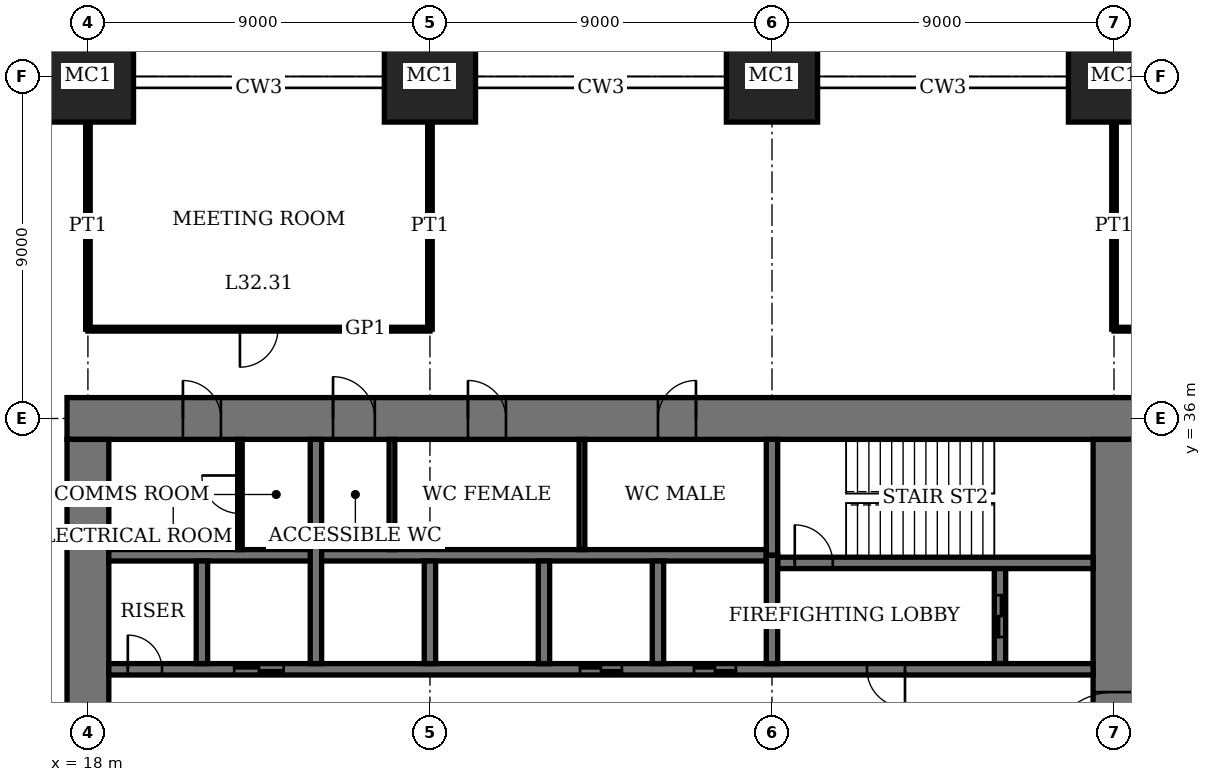
"""IFC4 building model, lengths in metres.
Left out: names, types, materials, properties, quantities, classifications, styles, units other than length and angle.
Written with IfcOpenShell. Run it as: python <this file> out.ifc"""

import sys

from ifc_helpers import new_model, si_unit, direction, frame, frame_2d, origin, origin_2d, place, context, subcontext, project, spatial, rectangle, extrude, element, fill, save


model = new_model("IFC4")
c1 = context("Model", 3, precision=1e-05, world=origin(), true_north=direction((0.0, 1.0)))
c2 = subcontext(c1, "Body", "Model", "MODEL_VIEW")
j1 = project(units=[si_unit("LENGTHUNIT", "METRE"), si_unit("PLANEANGLEUNIT", "RADIAN")], contexts=[c1])
p1 = place(None, origin())
s1 = spatial("IfcSite", under=j1, at=p1, CompositionType="ELEMENT")
p2 = place(p1, origin())
s2 = spatial("IfcBuilding", under=s1, at=p2, CompositionType="ELEMENT")
p3 = place(p2, frame((0.0, 0.0, 133.0)))
s3 = spatial("IfcBuildingStorey", under=s2, at=p3, CompositionType="ELEMENT", Elevation=133.0)
for number, where, z_axis, x_axis in (
    (1, (18.0, 45.0, 0.0), (0.0, 0.0, 1.0), (1.0, 0.0, 0.0)),
    (2, (27.0, 45.0, 0.0), (0.0, 0.0, 1.0), (1.0, 0.0, 0.0)),
    (3, (36.0, 45.0, 0.0), (0.0, 0.0, 1.0), (1.0, 0.0, 0.0)),
    (4, (45.0, 45.0, 0.0), (0.0, 0.0, 1.0), (1.0, 0.0, 0.0)),
):
    element("IfcColumn", number, at=place(p3, frame(where, z_axis=z_axis, x_axis=x_axis)), inside=s3, PredefinedType="COLUMN", context=c2, shape_type="SweptSolid", body=[
        extrude(rectangle(XDim=2.4, YDim=2.4, at=origin_2d()), origin(), (0.0, 0.0, 1.0), 4.0),
    ])
p4 = place(p3, frame((45.55, 36.0, 0.0), z_axis=(0.0, 0.0, 1.0), x_axis=(-1.0, 0.0, 0.0)))
e5 = element("IfcWall", 5, at=p4, inside=s3, PredefinedType="SHEAR", context=c2, shape_type="SweptSolid", body=[
    extrude(rectangle(XDim=28.1, YDim=1.1, at=frame_2d((14.05, 0.0))), origin(), (0.0, 0.0, 1.0), 4.0),
])
p5 = place(p4, frame((11.55, 0.0, 0.0)))
e6 = element("IfcOpeningElement", 6, at=p5, cuts=e5, PredefinedType="OPENING", context=c2, shape_type="SweptSolid", body=[
    extrude(rectangle(XDim=1.0, YDim=2.4, at=frame_2d((0.5, 1.2))), frame((0.0, 0.56, 0.0), z_axis=(0.0, -1.0, 0.0), x_axis=(1.0, 0.0, 0.0)), (0.0, 0.0, 1.0), 1.12),
])
p6 = place(p4, frame((16.55, 0.0, 0.0)))
e7 = element("IfcOpeningElement", 7, at=p6, cuts=e5, PredefinedType="OPENING", context=c2, shape_type="SweptSolid", body=[
    extrude(rectangle(XDim=1.0, YDim=2.4, at=frame_2d((0.5, 1.2))), frame((0.0, 0.56, 0.0), z_axis=(0.0, -1.0, 0.0), x_axis=(1.0, 0.0, 0.0)), (0.0, 0.0, 1.0), 1.12),
])
p7 = place(p4, frame((20.0, 0.0, 0.0)))
e8 = element("IfcOpeningElement", 8, at=p7, cuts=e5, PredefinedType="OPENING", context=c2, shape_type="SweptSolid", body=[
    extrude(rectangle(XDim=1.1, YDim=2.4, at=frame_2d((0.55, 1.2))), frame((0.0, 0.56, 0.0), z_axis=(0.0, -1.0, 0.0), x_axis=(1.0, 0.0, 0.0)), (0.0, 0.0, 1.0), 1.12),
])
p8 = place(p4, frame((24.05, 0.0, 0.0)))
e9 = element("IfcOpeningElement", 9, at=p8, cuts=e5, PredefinedType="OPENING", context=c2, shape_type="SweptSolid", body=[
    extrude(rectangle(XDim=1.0, YDim=2.4, at=frame_2d((0.5, 1.2))), frame((0.0, 0.56, 0.0), z_axis=(0.0, -1.0, 0.0), x_axis=(1.0, 0.0, 0.0)), (0.0, 0.0, 1.0), 1.12),
])
p9 = place(p3, frame((18.0, 35.45, 0.0), z_axis=(0.0, 0.0, 1.0), x_axis=(0.0, -1.0, 0.0)))
e10 = element("IfcWall", 10, at=p9, inside=s3, PredefinedType="SHEAR", context=c2, shape_type="SweptSolid", body=[
    extrude(rectangle(XDim=16.9, YDim=1.1, at=frame_2d((8.45, 0.0))), origin(), (0.0, 0.0, 1.0), 4.0),
])
p10 = place(p9, frame((8.45, 0.0, 0.0)))
e11 = element("IfcOpeningElement", 11, at=p10, cuts=e10, PredefinedType="OPENING", context=c2, shape_type="SweptSolid", body=[
    extrude(rectangle(XDim=1.8, YDim=2.4, at=frame_2d((0.9, 1.2))), frame((0.0, 0.56, 0.0), z_axis=(0.0, -1.0, 0.0), x_axis=(1.0, 0.0, 0.0)), (0.0, 0.0, 1.0), 1.12),
])
p11 = place(p3, frame((45.0, 18.55, 0.0), z_axis=(0.0, 0.0, 1.0), x_axis=(0.0, 1.0, 0.0)))
e12 = element("IfcWall", 12, at=p11, inside=s3, PredefinedType="SHEAR", context=c2, shape_type="SweptSolid", body=[
    extrude(rectangle(XDim=16.9, YDim=1.1, at=frame_2d((8.45, 0.0))), origin(), (0.0, 0.0, 1.0), 4.0),
])
p12 = place(p11, frame((8.45, 0.0, 0.0)))
e13 = element("IfcOpeningElement", 13, at=p12, cuts=e12, PredefinedType="OPENING", context=c2, shape_type="SweptSolid", body=[
    extrude(rectangle(XDim=1.8, YDim=2.4, at=frame_2d((0.9, 1.2))), frame((0.0, 0.56, 0.0), z_axis=(0.0, -1.0, 0.0), x_axis=(1.0, 0.0, 0.0)), (0.0, 0.0, 1.0), 1.12),
])
p13 = place(p3, frame((36.15, 32.2, 0.0), z_axis=(0.0, 0.0, 1.0), x_axis=(1.0, 0.0, 0.0)))
e14 = element("IfcWall", 14, at=p13, inside=s3, PredefinedType="SHEAR", context=c2, shape_type="SweptSolid", body=[
    extrude(rectangle(XDim=8.3, YDim=0.3, at=frame_2d((4.15, 0.0))), origin(), (0.0, 0.0, 1.0), 4.0),
])
p14 = place(p13, frame((0.45, 0.0, 0.0)))
e15 = element("IfcOpeningElement", 15, at=p14, cuts=e14, PredefinedType="OPENING", context=c2, shape_type="SweptSolid", body=[
    extrude(rectangle(XDim=1.0, YDim=2.4, at=frame_2d((0.5, 1.2))), frame((0.0, 0.16, 0.0), z_axis=(0.0, -1.0, 0.0), x_axis=(1.0, 0.0, 0.0)), (0.0, 0.0, 1.0), 0.32),
])
p15 = place(p3, frame((36.0, 32.4, 0.0), z_axis=(0.0, 0.0, 1.0), x_axis=(0.0, 1.0, 0.0)))
e16 = element("IfcWall", 16, at=p15, inside=s3, PredefinedType="SHEAR", context=c2, shape_type="SweptSolid", body=[
    extrude(rectangle(XDim=3.05, YDim=0.3, at=frame_2d((1.525, 0.0))), origin(), (0.0, 0.0, 1.0), 4.0),
])
p16 = place(p3, frame((42.0, 29.55, 0.0), z_axis=(0.0, 0.0, 1.0), x_axis=(0.0, 1.0, 0.0)))
e17 = element("IfcWall", 17, at=p16, inside=s3, PredefinedType="SHEAR", context=c2, shape_type="SweptSolid", body=[
    extrude(rectangle(XDim=2.5, YDim=0.3, at=frame_2d((1.25, 0.0))), origin(), (0.0, 0.0, 1.0), 4.0),
])
p17 = place(p16, frame((0.7, 0.0, 0.0)))
e18 = element("IfcOpeningElement", 18, at=p17, cuts=e17, PredefinedType="OPENING", context=c2, shape_type="SweptSolid", body=[
    extrude(rectangle(XDim=1.1, YDim=2.4, at=frame_2d((0.55, 1.2))), frame((0.0, 0.16, 0.0), z_axis=(0.0, -1.0, 0.0), x_axis=(1.0, 0.0, 0.0)), (0.0, 0.0, 1.0), 0.32),
])
p18 = place(p3, frame((18.55, 29.4, 0.0), z_axis=(0.0, 0.0, 1.0), x_axis=(1.0, 0.0, 0.0)))
e19 = element("IfcWall", 19, at=p18, inside=s3, PredefinedType="SHEAR", context=c2, shape_type="SweptSolid", body=[
    extrude(rectangle(XDim=25.9, YDim=0.3, at=frame_2d((12.95, 0.0))), origin(), (0.0, 0.0, 1.0), 4.0),
])
p19 = place(p18, frame((19.95, 0.0, 0.0)))
e20 = element("IfcOpeningElement", 20, at=p19, cuts=e19, PredefinedType="OPENING", context=c2, shape_type="SweptSolid", body=[
    extrude(rectangle(XDim=1.0, YDim=2.4, at=frame_2d((0.5, 1.2))), frame((0.0, 0.16, 0.0), z_axis=(0.0, -1.0, 0.0), x_axis=(1.0, 0.0, 0.0)), (0.0, 0.0, 1.0), 0.32),
])
p20 = place(p18, frame((0.5, 0.0, 0.0)))
e21 = element("IfcOpeningElement", 21, at=p20, cuts=e19, PredefinedType="OPENING", context=c2, shape_type="SweptSolid", body=[
    extrude(rectangle(XDim=0.9, YDim=2.1, at=frame_2d((0.45, 1.05))), frame((0.0, 0.16, 0.0), z_axis=(0.0, -1.0, 0.0), x_axis=(1.0, 0.0, 0.0)), (0.0, 0.0, 1.0), 0.32),
])
p21 = place(p18, frame((15.4, 0.0, 0.0)))
e22 = element("IfcOpeningElement", 22, at=p21, cuts=e19, PredefinedType="OPENING", context=c2, shape_type="SweptSolid", body=[
    extrude(rectangle(XDim=1.1, YDim=2.4, at=frame_2d((0.55, 1.2))), frame((0.0, 0.16, 0.0), z_axis=(0.0, -1.0, 0.0), x_axis=(1.0, 0.0, 0.0)), (0.0, 0.0, 1.0), 0.32),
])
p22 = place(p18, frame((12.4, 0.0, 0.0)))
e23 = element("IfcOpeningElement", 23, at=p22, cuts=e19, PredefinedType="OPENING", context=c2, shape_type="SweptSolid", body=[
    extrude(rectangle(XDim=1.1, YDim=2.4, at=frame_2d((0.55, 1.2))), frame((0.0, 0.16, 0.0), z_axis=(0.0, -1.0, 0.0), x_axis=(1.0, 0.0, 0.0)), (0.0, 0.0, 1.0), 0.32),
])
p23 = place(p18, frame((3.3, 0.0, 0.0)))
e24 = element("IfcOpeningElement", 24, at=p23, cuts=e19, PredefinedType="OPENING", context=c2, shape_type="SweptSolid", body=[
    extrude(rectangle(XDim=1.3, YDim=2.4, at=frame_2d((0.65, 1.2))), frame((0.0, 0.16, 0.0), z_axis=(0.0, -1.0, 0.0), x_axis=(1.0, 0.0, 0.0)), (0.0, 0.0, 1.0), 0.32),
])
p24 = place(p3, frame((18.55, 32.4, 0.0), z_axis=(0.0, 0.0, 1.0), x_axis=(1.0, 0.0, 0.0)))
e25 = element("IfcWall", 25, at=p24, inside=s3, PredefinedType="SHEAR", context=c2, shape_type="SweptSolid", body=[
    extrude(rectangle(XDim=17.3, YDim=0.3, at=frame_2d((8.65, 0.0))), origin(), (0.0, 0.0, 1.0), 4.0),
])
for number, where, z_axis, x_axis in (
    (26, (33.0, 29.55, 0.0), (0.0, 0.0, 1.0), (0.0, 1.0, 0.0)),
    (27, (30.0, 29.55, 0.0), (0.0, 0.0, 1.0), (0.0, 1.0, 0.0)),
    (28, (27.0, 29.55, 0.0), (0.0, 0.0, 1.0), (0.0, 1.0, 0.0)),
):
    element("IfcWall", number, at=place(p3, frame(where, z_axis=z_axis, x_axis=x_axis)), inside=s3, PredefinedType="SHEAR", context=c2, shape_type="SweptSolid", body=[
        extrude(rectangle(XDim=2.7, YDim=0.3, at=frame_2d((1.35, 0.0))), origin(), (0.0, 0.0, 1.0), 4.0),
    ])
p25 = place(p3, frame((24.0, 29.55, 0.0), z_axis=(0.0, 0.0, 1.0), x_axis=(0.0, 1.0, 0.0)))
e29 = element("IfcWall", 29, at=p25, inside=s3, PredefinedType="SHEAR", context=c2, shape_type="SweptSolid", body=[
    extrude(rectangle(XDim=5.9, YDim=0.3, at=frame_2d((2.95, 0.0))), origin(), (0.0, 0.0, 1.0), 4.0),
])
p26 = place(p3, frame((21.0, 29.55, 0.0), z_axis=(0.0, 0.0, 1.0), x_axis=(0.0, 1.0, 0.0)))
e30 = element("IfcWall", 30, at=p26, inside=s3, PredefinedType="SHEAR", context=c2, shape_type="SweptSolid", body=[
    extrude(rectangle(XDim=2.7, YDim=0.3, at=frame_2d((1.35, 0.0))), origin(), (0.0, 0.0, 1.0), 4.0),
])
p27 = place(p3, frame((36.0, 29.55, 0.0), z_axis=(0.0, 0.0, 1.0), x_axis=(0.0, 1.0, 0.0)))
e31 = element("IfcWall", 31, at=p27, inside=s3, PredefinedType="SHEAR", context=c2, shape_type="SweptSolid", body=[
    extrude(rectangle(XDim=2.85, YDim=0.3, at=frame_2d((1.425, 0.0))), origin(), (0.0, 0.0, 1.0), 4.0),
])
p28 = place(p3, frame((18.0, 38.35, 0.0), z_axis=(0.0, 0.0, 1.0), x_axis=(1.0, 0.0, 0.0)))
e32 = element("IfcWall", 32, at=p28, inside=s3, PredefinedType="PARTITIONING", context=c2, shape_type="SweptSolid", body=[
    extrude(rectangle(XDim=9.0, YDim=0.1, at=frame_2d((4.5, 0.0))), origin(), (0.0, 0.0, 1.0), 3.75),
])
p29 = place(p28, frame((4.0, 0.0, 0.0)))
e33 = element("IfcOpeningElement", 33, at=p29, cuts=e32, PredefinedType="OPENING", context=c2, shape_type="SweptSolid", body=[
    extrude(rectangle(XDim=1.0, YDim=2.4, at=frame_2d((0.5, 1.2))), frame((0.0, 0.06, 0.0), z_axis=(0.0, -1.0, 0.0), x_axis=(1.0, 0.0, 0.0)), (0.0, 0.0, 1.0), 0.12),
])
p30 = place(p3, frame((45.0, 38.35, 0.0), z_axis=(0.0, 0.0, 1.0), x_axis=(1.0, 0.0, 0.0)))
e34 = element("IfcWall", 34, at=p30, inside=s3, PredefinedType="PARTITIONING", context=c2, shape_type="SweptSolid", body=[
    extrude(rectangle(XDim=9.0, YDim=0.1, at=frame_2d((4.5, 0.0))), origin(), (0.0, 0.0, 1.0), 3.75),
])
p31 = place(p30, frame((4.0, 0.0, 0.0)))
e35 = element("IfcOpeningElement", 35, at=p31, cuts=e34, PredefinedType="OPENING", context=c2, shape_type="SweptSolid", body=[
    extrude(rectangle(XDim=1.0, YDim=2.4, at=frame_2d((0.5, 1.2))), frame((0.0, 0.06, 0.0), z_axis=(0.0, -1.0, 0.0), x_axis=(1.0, 0.0, 0.0)), (0.0, 0.0, 1.0), 0.12),
])
for number, where, z_axis, x_axis in (
    (36, (18.0, 38.35, 0.0), (0.0, 0.0, 1.0), (0.0, 1.0, 0.0)),
    (37, (27.0, 38.35, 0.0), (0.0, 0.0, 1.0), (0.0, 1.0, 0.0)),
    (38, (45.0, 38.35, 0.0), (0.0, 0.0, 1.0), (0.0, 1.0, 0.0)),
):
    element("IfcWall", number, at=place(p3, frame(where, z_axis=z_axis, x_axis=x_axis)), inside=s3, PredefinedType="PARTITIONING", context=c2, shape_type="SweptSolid", body=[
        extrude(rectangle(XDim=5.45, YDim=0.12, at=frame_2d((2.725, 0.0))), origin(), (0.0, 0.0, 1.0), 3.05),
    ])
for number, where, z_axis, x_axis in (
    (39, (31.0, 32.55, 0.0), (0.0, 0.0, 1.0), (0.0, 1.0, 0.0)),
    (40, (26.0, 32.55, 0.0), (0.0, 0.0, 1.0), (0.0, 1.0, 0.0)),
):
    element("IfcWall", number, at=place(p3, frame(where, z_axis=z_axis, x_axis=x_axis)), inside=s3, PredefinedType="PARTITIONING", context=c2, shape_type="SweptSolid", body=[
        extrude(rectangle(XDim=2.9, YDim=0.15, at=frame_2d((1.45, 0.0))), origin(), (0.0, 0.0, 1.0), 3.75),
    ])
p32 = place(p3, frame((22.0, 32.55, 0.0), z_axis=(0.0, 0.0, 1.0), x_axis=(0.0, 1.0, 0.0)))
e41 = element("IfcWall", 41, at=p32, inside=s3, PredefinedType="PARTITIONING", context=c2, shape_type="SweptSolid", body=[
    extrude(rectangle(XDim=2.9, YDim=0.12, at=frame_2d((1.45, 0.0))), origin(), (0.0, 0.0, 1.0), 3.75),
])
p33 = place(p32, frame((0.95, 0.0, 0.0)))
e42 = element("IfcOpeningElement", 42, at=p33, cuts=e41, PredefinedType="OPENING", context=c2, shape_type="SweptSolid", body=[
    extrude(rectangle(XDim=1.0, YDim=2.4, at=frame_2d((0.5, 1.2))), frame((0.0, 0.07, 0.0), z_axis=(0.0, -1.0, 0.0), x_axis=(1.0, 0.0, 0.0)), (0.0, 0.0, 1.0), 0.14),
])
p34 = place(p12, origin())
e43 = element("IfcDoor", 43, at=p34, inside=s3, OperationType="DOUBLE_DOOR_DOUBLE_SWING", PredefinedType="DOOR", context=c2, shape_type="SweptSolid", body=[
    extrude(rectangle(XDim=1.8, YDim=2.4, at=frame_2d((0.9, 1.2))), frame((0.0, 0.03, 0.0), z_axis=(0.0, -1.0, 0.0), x_axis=(1.0, 0.0, 0.0)), (0.0, 0.0, 1.0), 0.06),
    extrude(rectangle(XDim=0.04, YDim=2.4, at=frame_2d((0.02, 1.2))), frame((0.0, 0.55, 0.0), z_axis=(0.0, -1.0, 0.0), x_axis=(1.0, 0.0, 0.0)), (0.0, 0.0, 1.0), 1.1),
    extrude(rectangle(XDim=0.04, YDim=2.4, at=frame_2d((1.78, 1.2))), frame((0.0, 0.55, 0.0), z_axis=(0.0, -1.0, 0.0), x_axis=(1.0, 0.0, 0.0)), (0.0, 0.0, 1.0), 1.1),
    extrude(rectangle(XDim=1.8, YDim=0.04, at=frame_2d((0.9, 2.38))), frame((0.0, 0.55, 0.0), z_axis=(0.0, -1.0, 0.0), x_axis=(1.0, 0.0, 0.0)), (0.0, 0.0, 1.0), 1.1),
])
fill(e13, e43)
p35 = place(p5, origin())
e44 = element("IfcDoor", 44, at=p35, inside=s3, OperationType="SINGLE_SWING_LEFT", PredefinedType="DOOR", context=c2, shape_type="SweptSolid", body=[
    extrude(rectangle(XDim=1.0, YDim=2.4, at=frame_2d((0.5, 1.2))), frame((0.0, 0.025, 0.0), z_axis=(0.0, -1.0, 0.0), x_axis=(1.0, 0.0, 0.0)), (0.0, 0.0, 1.0), 0.05),
    extrude(rectangle(XDim=0.04, YDim=2.4, at=frame_2d((0.02, 1.2))), frame((0.0, 0.4, 0.0), z_axis=(0.0, -1.0, 0.0), x_axis=(1.0, 0.0, 0.0)), (0.0, 0.0, 1.0), 0.8),
    extrude(rectangle(XDim=0.04, YDim=2.4, at=frame_2d((0.98, 1.2))), frame((0.0, 0.4, 0.0), z_axis=(0.0, -1.0, 0.0), x_axis=(1.0, 0.0, 0.0)), (0.0, 0.0, 1.0), 0.8),
    extrude(rectangle(XDim=1.0, YDim=0.04, at=frame_2d((0.5, 2.38))), frame((0.0, 0.4, 0.0), z_axis=(0.0, -1.0, 0.0), x_axis=(1.0, 0.0, 0.0)), (0.0, 0.0, 1.0), 0.8),
])
fill(e6, e44)
p36 = place(p6, origin())
e45 = element("IfcDoor", 45, at=p36, inside=s3, OperationType="SINGLE_SWING_RIGHT", PredefinedType="DOOR", context=c2, shape_type="SweptSolid", body=[
    extrude(rectangle(XDim=1.0, YDim=2.4, at=frame_2d((0.5, 1.2))), frame((0.0, 0.025, 0.0), z_axis=(0.0, -1.0, 0.0), x_axis=(1.0, 0.0, 0.0)), (0.0, 0.0, 1.0), 0.05),
    extrude(rectangle(XDim=0.04, YDim=2.4, at=frame_2d((0.02, 1.2))), frame((0.0, 0.4, 0.0), z_axis=(0.0, -1.0, 0.0), x_axis=(1.0, 0.0, 0.0)), (0.0, 0.0, 1.0), 0.8),
    extrude(rectangle(XDim=0.04, YDim=2.4, at=frame_2d((0.98, 1.2))), frame((0.0, 0.4, 0.0), z_axis=(0.0, -1.0, 0.0), x_axis=(1.0, 0.0, 0.0)), (0.0, 0.0, 1.0), 0.8),
    extrude(rectangle(XDim=1.0, YDim=0.04, at=frame_2d((0.5, 2.38))), frame((0.0, 0.4, 0.0), z_axis=(0.0, -1.0, 0.0), x_axis=(1.0, 0.0, 0.0)), (0.0, 0.0, 1.0), 0.8),
])
fill(e7, e45)
p37 = place(p7, origin())
e46 = element("IfcDoor", 46, at=p37, inside=s3, OperationType="SINGLE_SWING_RIGHT", PredefinedType="DOOR", context=c2, shape_type="SweptSolid", body=[
    extrude(rectangle(XDim=1.1, YDim=2.4, at=frame_2d((0.55, 1.2))), frame((0.0, 0.025, 0.0), z_axis=(0.0, -1.0, 0.0), x_axis=(1.0, 0.0, 0.0)), (0.0, 0.0, 1.0), 0.05),
    extrude(rectangle(XDim=0.04, YDim=2.4, at=frame_2d((0.02, 1.2))), frame((0.0, 0.44, 0.0), z_axis=(0.0, -1.0, 0.0), x_axis=(1.0, 0.0, 0.0)), (0.0, 0.0, 1.0), 0.88),
    extrude(rectangle(XDim=0.04, YDim=2.4, at=frame_2d((1.08, 1.2))), frame((0.0, 0.44, 0.0), z_axis=(0.0, -1.0, 0.0), x_axis=(1.0, 0.0, 0.0)), (0.0, 0.0, 1.0), 0.88),
    extrude(rectangle(XDim=1.1, YDim=0.04, at=frame_2d((0.55, 2.38))), frame((0.0, 0.44, 0.0), z_axis=(0.0, -1.0, 0.0), x_axis=(1.0, 0.0, 0.0)), (0.0, 0.0, 1.0), 0.88),
])
fill(e8, e46)
p38 = place(p8, origin())
e47 = element("IfcDoor", 47, at=p38, inside=s3, OperationType="SINGLE_SWING_RIGHT", PredefinedType="DOOR", context=c2, shape_type="SweptSolid", body=[
    extrude(rectangle(XDim=1.0, YDim=2.4, at=frame_2d((0.5, 1.2))), frame((0.0, 0.025, 0.0), z_axis=(0.0, -1.0, 0.0), x_axis=(1.0, 0.0, 0.0)), (0.0, 0.0, 1.0), 0.05),
    extrude(rectangle(XDim=0.04, YDim=2.4, at=frame_2d((0.02, 1.2))), frame((0.0, 0.4, 0.0), z_axis=(0.0, -1.0, 0.0), x_axis=(1.0, 0.0, 0.0)), (0.0, 0.0, 1.0), 0.8),
    extrude(rectangle(XDim=0.04, YDim=2.4, at=frame_2d((0.98, 1.2))), frame((0.0, 0.4, 0.0), z_axis=(0.0, -1.0, 0.0), x_axis=(1.0, 0.0, 0.0)), (0.0, 0.0, 1.0), 0.8),
    extrude(rectangle(XDim=1.0, YDim=0.04, at=frame_2d((0.5, 2.38))), frame((0.0, 0.4, 0.0), z_axis=(0.0, -1.0, 0.0), x_axis=(1.0, 0.0, 0.0)), (0.0, 0.0, 1.0), 0.8),
])
fill(e9, e47)
p39 = place(p14, origin())
e48 = element("IfcDoor", 48, at=p39, inside=s3, OperationType="SINGLE_SWING_RIGHT", PredefinedType="DOOR", context=c2, shape_type="SweptSolid", body=[
    extrude(rectangle(XDim=1.0, YDim=2.4, at=frame_2d((0.5, 1.2))), frame((0.0, 0.03, 0.0), z_axis=(0.0, -1.0, 0.0), x_axis=(1.0, 0.0, 0.0)), (0.0, 0.0, 1.0), 0.06),
])
fill(e15, e48)
p40 = place(p19, origin())
e49 = element("IfcDoor", 49, at=p40, inside=s3, OperationType="SINGLE_SWING_RIGHT", PredefinedType="DOOR", context=c2, shape_type="SweptSolid", body=[
    extrude(rectangle(XDim=1.0, YDim=2.4, at=frame_2d((0.5, 1.2))), frame((0.0, 0.03, 0.0), z_axis=(0.0, -1.0, 0.0), x_axis=(1.0, 0.0, 0.0)), (0.0, 0.0, 1.0), 0.06),
])
fill(e20, e49)
p41 = place(p20, origin())
e50 = element("IfcDoor", 50, at=p41, inside=s3, OperationType="SINGLE_SWING_RIGHT", PredefinedType="DOOR", context=c2, shape_type="SweptSolid", body=[
    extrude(rectangle(XDim=0.9, YDim=2.1, at=frame_2d((0.45, 1.05))), frame((0.0, 0.03, 0.0), z_axis=(0.0, -1.0, 0.0), x_axis=(1.0, 0.0, 0.0)), (0.0, 0.0, 1.0), 0.06),
])
fill(e21, e50)
p42 = place(p29, origin())
e51 = element("IfcDoor", 51, at=p42, inside=s3, OperationType="SINGLE_SWING_LEFT", PredefinedType="DOOR", context=c2, shape_type="SweptSolid", body=[
    extrude(rectangle(XDim=1.0, YDim=2.4, at=frame_2d((0.5, 1.2))), frame((0.0, 0.02, 0.0), z_axis=(0.0, -1.0, 0.0), x_axis=(1.0, 0.0, 0.0)), (0.0, 0.0, 1.0), 0.04),
])
fill(e33, e51)
p43 = place(p33, origin())
e52 = element("IfcDoor", 52, at=p43, inside=s3, OperationType="SINGLE_SWING_LEFT", PredefinedType="DOOR", context=c2, shape_type="SweptSolid", body=[
    extrude(rectangle(XDim=1.0, YDim=2.4, at=frame_2d((0.5, 1.2))), frame((0.0, 0.03, 0.0), z_axis=(0.0, -1.0, 0.0), x_axis=(1.0, 0.0, 0.0)), (0.0, 0.0, 1.0), 0.06),
])
fill(e42, e52)
p44 = place(p21, origin())
e53 = element("IfcDoor", 53, at=p44, inside=s3, OperationType="DOUBLE_DOOR_SLIDING", PredefinedType="DOOR", context=c2, shape_type="SweptSolid", body=[
    extrude(rectangle(XDim=1.1, YDim=2.4, at=frame_2d((0.55, 1.2))), frame((0.0, 0.02, 0.0), z_axis=(0.0, -1.0, 0.0), x_axis=(1.0, 0.0, 0.0)), (0.0, 0.0, 1.0), 0.04),
])
fill(e22, e53)
p45 = place(p22, origin())
e54 = element("IfcDoor", 54, at=p45, inside=s3, OperationType="DOUBLE_DOOR_SLIDING", PredefinedType="DOOR", context=c2, shape_type="SweptSolid", body=[
    extrude(rectangle(XDim=1.1, YDim=2.4, at=frame_2d((0.55, 1.2))), frame((0.0, 0.02, 0.0), z_axis=(0.0, -1.0, 0.0), x_axis=(1.0, 0.0, 0.0)), (0.0, 0.0, 1.0), 0.04),
])
fill(e23, e54)
p46 = place(p23, origin())
e55 = element("IfcDoor", 55, at=p46, inside=s3, OperationType="DOUBLE_DOOR_SLIDING", PredefinedType="DOOR", context=c2, shape_type="SweptSolid", body=[
    extrude(rectangle(XDim=1.3, YDim=2.4, at=frame_2d((0.65, 1.2))), frame((0.0, 0.02, 0.0), z_axis=(0.0, -1.0, 0.0), x_axis=(1.0, 0.0, 0.0)), (0.0, 0.0, 1.0), 0.04),
])
fill(e24, e55)
p47 = place(p17, origin())
e56 = element("IfcDoor", 56, at=p47, inside=s3, OperationType="DOUBLE_DOOR_SLIDING", PredefinedType="DOOR", context=c2, shape_type="SweptSolid", body=[
    extrude(rectangle(XDim=1.1, YDim=2.4, at=frame_2d((0.55, 1.2))), frame((0.0, 0.03, 0.0), z_axis=(0.0, -1.0, 0.0), x_axis=(1.0, 0.0, 0.0)), (0.0, 0.0, 1.0), 0.06),
])
fill(e18, e56)
save(model, sys.argv[1])
